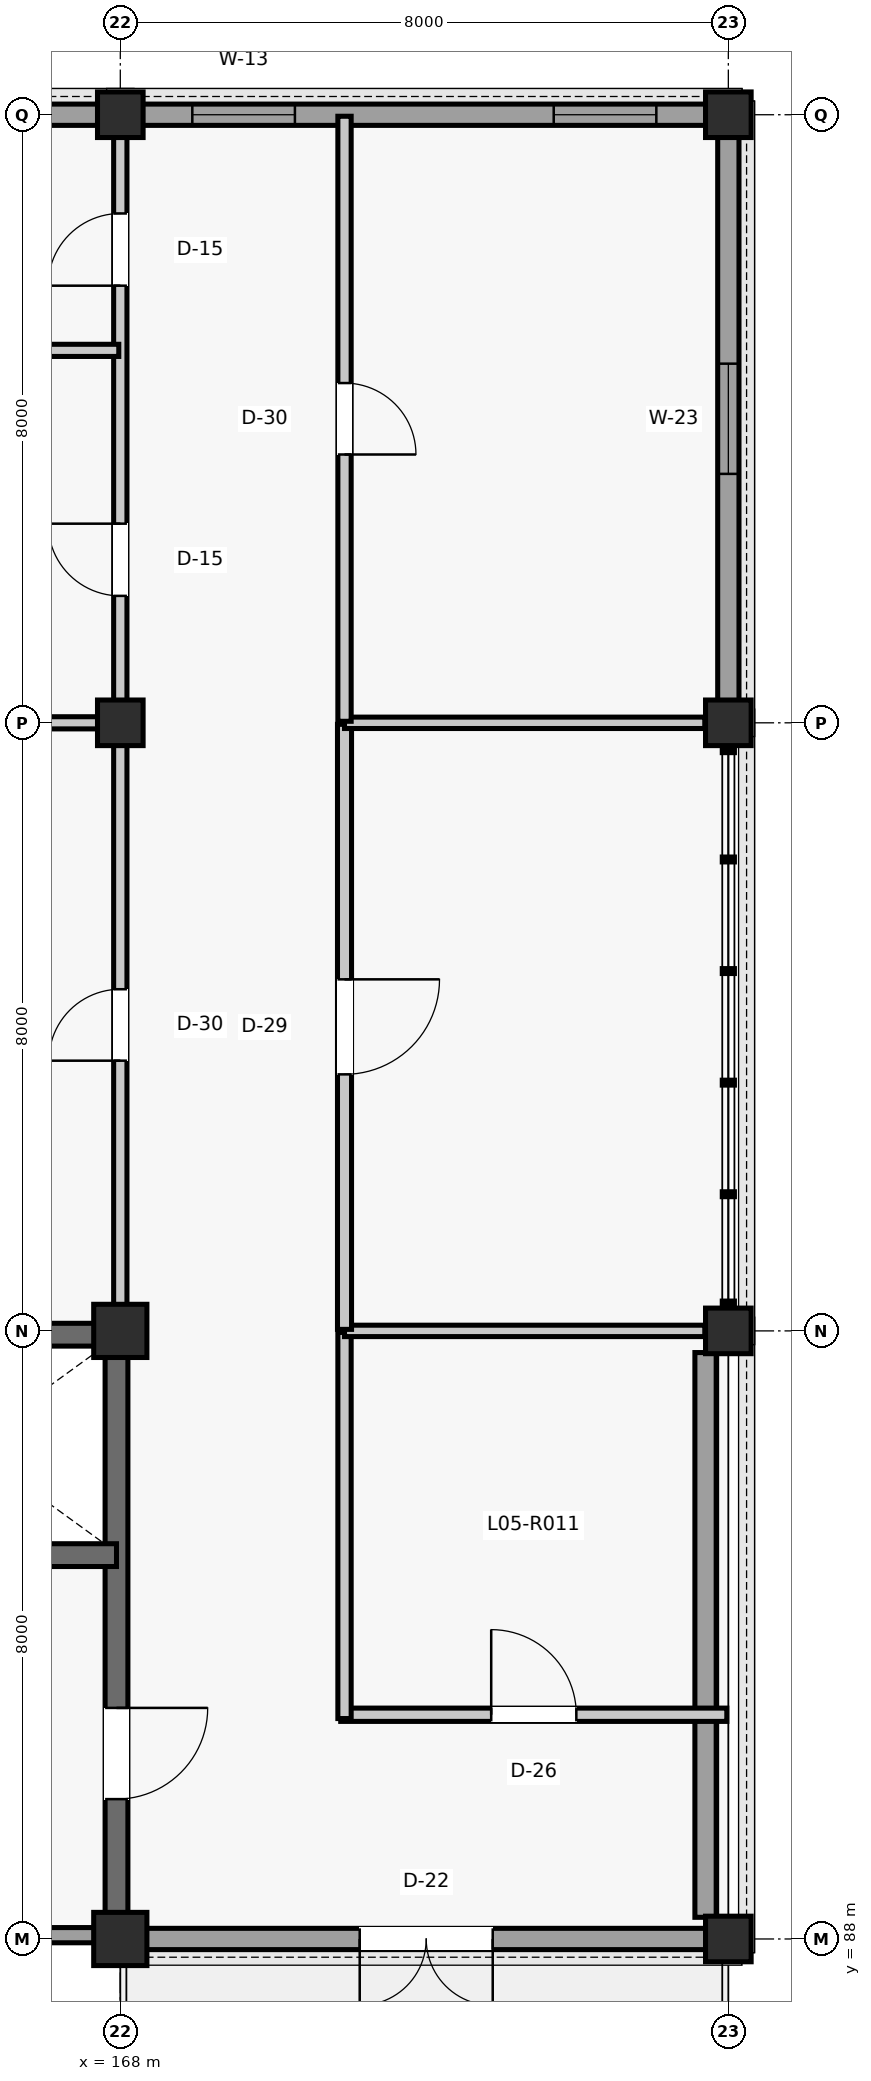
"""IFC4 building model, lengths in metres.
Left out: names, types, materials, properties, quantities, classifications, styles, units other than length and angle.
Written with IfcOpenShell. Run it as: python <this file> out.ifc"""

import sys

from ifc_helpers import new_model, si_unit, direction, frame, frame_2d, origin, origin_2d, place, context, subcontext, project, spatial, rectangle, extrude, element, fill, save


model = new_model("IFC4")
c1 = context("Model", 3, precision=1e-05, world=origin(), true_north=direction((0.0, 1.0)))
c2 = subcontext(c1, "Body", "Model", "MODEL_VIEW")
j1 = project(units=[si_unit("LENGTHUNIT", "METRE"), si_unit("PLANEANGLEUNIT", "RADIAN")], contexts=[c1])
p1 = place(None, origin())
s1 = spatial("IfcSite", under=j1, at=p1, CompositionType="ELEMENT")
p2 = place(p1, origin())
s2 = spatial("IfcBuilding", under=s1, at=p2, CompositionType="ELEMENT")
p3 = place(p2, frame((0.0, 0.0, 21.78)))
s3 = spatial("IfcBuildingStorey", under=s2, at=p3, CompositionType="ELEMENT", Elevation=21.78)
for number, where, z_axis, x_axis in (
    (1, (168.0, 88.0, 0.0), (0.0, 0.0, 1.0), (1.0, 0.0, 0.0)),
    (2, (168.0, 96.0, 0.0), (0.0, 0.0, 1.0), (1.0, 0.0, 0.0)),
):
    element("IfcColumn", number, at=place(p3, frame(where, z_axis=z_axis, x_axis=x_axis)), inside=s3, PredefinedType="COLUMN", context=c2, shape_type="SweptSolid", body=[
        extrude(rectangle(XDim=0.7, YDim=0.7, at=origin_2d()), origin(), (0.0, 0.0, 1.0), 3.96),
    ])
for number, where, z_axis, x_axis in (
    (3, (168.0, 104.0, 0.0), (0.0, 0.0, 1.0), (1.0, 0.0, 0.0)),
    (4, (168.0, 112.0, 0.0), (0.0, 0.0, 1.0), (1.0, 0.0, 0.0)),
    (5, (176.0, 88.0, 0.0), (0.0, 0.0, 1.0), (1.0, 0.0, 0.0)),
    (6, (176.0, 96.0, 0.0), (0.0, 0.0, 1.0), (1.0, 0.0, 0.0)),
    (7, (176.0, 104.0, 0.0), (0.0, 0.0, 1.0), (1.0, 0.0, 0.0)),
    (8, (176.0, 112.0, 0.0), (0.0, 0.0, 1.0), (1.0, 0.0, 0.0)),
):
    element("IfcColumn", number, at=place(p3, frame(where, z_axis=z_axis, x_axis=x_axis)), inside=s3, PredefinedType="COLUMN", context=c2, shape_type="SweptSolid", body=[
        extrude(rectangle(XDim=0.6, YDim=0.6, at=origin_2d()), origin(), (0.0, 0.0, 1.0), 3.96),
    ])
p4 = place(p3, frame((160.285, 112.0, 0.0), z_axis=(0.0, 0.0, 1.0), x_axis=(1.0, 0.0, 0.0)))
e9 = element("IfcWall", 9, at=p4, inside=s3, PredefinedType="SOLIDWALL", context=c2, shape_type="SweptSolid", body=[
    extrude(rectangle(XDim=7.43, YDim=0.28, at=frame_2d((3.715, 0.0))), origin(), (0.0, 0.0, 1.0), 3.372),
])
p5 = place(p4, frame((0.862, 0.0, 1.2)))
e10 = element("IfcOpeningElement", 10, at=p5, cuts=e9, PredefinedType="OPENING", context=c2, shape_type="SweptSolid", body=[
    extrude(rectangle(XDim=0.95, YDim=1.4, at=frame_2d((0.475, 0.7))), frame((0.0, 0.15, 0.0), z_axis=(0.0, -1.0, 0.0), x_axis=(1.0, 0.0, 0.0)), (0.0, 0.0, 1.0), 0.3),
])
p6 = place(p4, frame((5.618, 0.0, 1.2)))
e11 = element("IfcOpeningElement", 11, at=p6, cuts=e9, PredefinedType="OPENING", context=c2, shape_type="SweptSolid", body=[
    extrude(rectangle(XDim=0.95, YDim=1.4, at=frame_2d((0.475, 0.7))), frame((0.0, 0.15, 0.0), z_axis=(0.0, -1.0, 0.0), x_axis=(1.0, 0.0, 0.0)), (0.0, 0.0, 1.0), 0.3),
])
p7 = place(p3, frame((168.335, 88.0, 0.0), z_axis=(0.0, 0.0, 1.0), x_axis=(1.0, 0.0, 0.0)))
e12 = element("IfcWall", 12, at=p7, inside=s3, PredefinedType="SOLIDWALL", context=c2, shape_type="SweptSolid", body=[
    extrude(rectangle(XDim=7.38, YDim=0.28, at=frame_2d((3.69, 0.0))), origin(), (0.0, 0.0, 1.0), 3.259),
])
p8 = place(p7, frame((2.815, 0.0, 0.0)))
e13 = element("IfcOpeningElement", 13, at=p8, cuts=e12, PredefinedType="OPENING", context=c2, shape_type="SweptSolid", body=[
    extrude(rectangle(XDim=1.75, YDim=2.2, at=frame_2d((0.875, 1.1))), frame((0.0, 0.15, 0.0), z_axis=(0.0, -1.0, 0.0), x_axis=(1.0, 0.0, 0.0)), (0.0, 0.0, 1.0), 0.3),
])
p9 = place(p3, frame((175.7, 88.285, 0.0), z_axis=(0.0, 0.0, 1.0), x_axis=(0.0, 1.0, 0.0)))
e14 = element("IfcWall", 14, at=p9, inside=s3, PredefinedType="SOLIDWALL", context=c2, shape_type="SweptSolid", body=[
    extrude(rectangle(XDim=7.43, YDim=0.28, at=frame_2d((3.715, 0.0))), origin(), (0.0, 0.0, 1.0), 3.309),
])
p10 = place(p3, frame((168.285, 112.0, 0.0), z_axis=(0.0, 0.0, 1.0), x_axis=(1.0, 0.0, 0.0)))
e15 = element("IfcWall", 15, at=p10, inside=s3, PredefinedType="SOLIDWALL", context=c2, shape_type="SweptSolid", body=[
    extrude(rectangle(XDim=7.43, YDim=0.28, at=frame_2d((3.715, 0.0))), origin(), (0.0, 0.0, 1.0), 3.305),
])
p11 = place(p10, frame((0.662, 0.0, 0.95)))
e16 = element("IfcOpeningElement", 16, at=p11, cuts=e15, PredefinedType="OPENING", context=c2, shape_type="SweptSolid", body=[
    extrude(rectangle(XDim=1.35, YDim=1.9, at=frame_2d((0.675, 0.95))), frame((0.0, 0.15, 0.0), z_axis=(0.0, -1.0, 0.0), x_axis=(1.0, 0.0, 0.0)), (0.0, 0.0, 1.0), 0.3),
])
p12 = place(p10, frame((5.417, 0.0, 0.95)))
e17 = element("IfcOpeningElement", 17, at=p12, cuts=e15, PredefinedType="OPENING", context=c2, shape_type="SweptSolid", body=[
    extrude(rectangle(XDim=1.35, YDim=1.9, at=frame_2d((0.675, 0.95))), frame((0.0, 0.15, 0.0), z_axis=(0.0, -1.0, 0.0), x_axis=(1.0, 0.0, 0.0)), (0.0, 0.0, 1.0), 0.3),
])
p13 = place(p3, frame((176.0, 104.285, 0.0), z_axis=(0.0, 0.0, 1.0), x_axis=(0.0, 1.0, 0.0)))
e18 = element("IfcWall", 18, at=p13, inside=s3, PredefinedType="SOLIDWALL", context=c2, shape_type="SweptSolid", body=[
    extrude(rectangle(XDim=7.43, YDim=0.28, at=frame_2d((3.715, 0.0))), origin(), (0.0, 0.0, 1.0), 3.305),
])
p14 = place(p13, frame((2.99, 0.0, 0.9)))
e19 = element("IfcOpeningElement", 19, at=p14, cuts=e18, PredefinedType="OPENING", context=c2, shape_type="SweptSolid", body=[
    extrude(rectangle(XDim=1.45, YDim=2.15, at=frame_2d((0.725, 1.075))), frame((0.0, 0.15, 0.0), z_axis=(0.0, -1.0, 0.0), x_axis=(1.0, 0.0, 0.0)), (0.0, 0.0, 1.0), 0.3),
])
p15 = place(p3, frame((160.24, 95.95, 0.0), z_axis=(0.0, 0.0, 1.0), x_axis=(1.0, 0.0, 0.0)))
e20 = element("IfcWall", 20, at=p15, inside=s3, PredefinedType="SHEAR", context=c2, shape_type="SweptSolid", body=[
    extrude(rectangle(XDim=7.52, YDim=0.3, at=frame_2d((3.76, 0.0))), origin(), (0.0, 0.0, 1.0), 3.735),
])
p16 = place(p3, frame((167.95, 88.24, 0.0), z_axis=(0.0, 0.0, 1.0), x_axis=(0.0, 1.0, 0.0)))
e21 = element("IfcWall", 21, at=p16, inside=s3, PredefinedType="SHEAR", context=c2, shape_type="SweptSolid", body=[
    extrude(rectangle(XDim=7.52, YDim=0.3, at=frame_2d((3.76, 0.0))), origin(), (0.0, 0.0, 1.0), 3.735),
])
p17 = place(p16, frame((1.6, 0.0, 0.0)))
e22 = element("IfcOpeningElement", 22, at=p17, cuts=e21, PredefinedType="OPENING", context=c2, shape_type="SweptSolid", body=[
    extrude(rectangle(XDim=1.2, YDim=2.15, at=frame_2d((0.6, 1.075))), frame((0.0, 0.16, 0.0), z_axis=(0.0, -1.0, 0.0), x_axis=(1.0, 0.0, 0.0)), (0.0, 0.0, 1.0), 0.32),
])
p18 = place(p3, frame((164.0, 93.05, 0.0), z_axis=(0.0, 0.0, 1.0), x_axis=(1.0, 0.0, 0.0)))
e23 = element("IfcWall", 23, at=p18, inside=s3, PredefinedType="SHEAR", context=c2, shape_type="SweptSolid", body=[
    extrude(rectangle(XDim=3.95, YDim=0.3, at=frame_2d((1.975, 0.0))), origin(), (0.0, 0.0, 1.0), 3.735),
])
p19 = place(p18, frame((1.375, 0.0, 0.0)))
e24 = element("IfcOpeningElement", 24, at=p19, cuts=e23, PredefinedType="OPENING", context=c2, shape_type="SweptSolid", body=[
    extrude(rectangle(XDim=1.2, YDim=2.2, at=frame_2d((0.6, 1.1))), frame((0.0, 0.16, 0.0), z_axis=(0.0, -1.0, 0.0), x_axis=(1.0, 0.0, 0.0)), (0.0, 0.0, 1.0), 0.32),
])
p20 = place(p3, frame((164.0, 88.05, 0.0), z_axis=(0.0, 0.0, 1.0), x_axis=(1.0, 0.0, 0.0)))
e25 = element("IfcWall", 25, at=p20, inside=s3, PredefinedType="PARTITIONING", context=c2, shape_type="SweptSolid", body=[
    extrude(rectangle(XDim=3.66, YDim=0.2, at=frame_2d((1.83, 0.0))), origin(), (0.0, 0.0, 1.0), 3.303),
])
p21 = place(p3, frame((170.9, 90.95, 0.0), z_axis=(0.0, 0.0, 1.0), x_axis=(1.0, 0.0, 0.0)))
e26 = element("IfcWall", 26, at=p21, inside=s3, PredefinedType="PARTITIONING", context=c2, shape_type="SweptSolid", body=[
    extrude(rectangle(XDim=5.08, YDim=0.175, at=frame_2d((2.54, 0.0))), origin(), (0.0, 0.0, 1.0), 3.302),
])
p22 = place(p21, frame((1.98, 0.0, 0.0)))
e27 = element("IfcOpeningElement", 27, at=p22, cuts=e26, PredefinedType="OPENING", context=c2, shape_type="SweptSolid", body=[
    extrude(rectangle(XDim=1.12, YDim=2.22, at=frame_2d((0.56, 1.11))), frame((0.0, 0.097, 0.0), z_axis=(0.0, -1.0, 0.0), x_axis=(1.0, 0.0, 0.0)), (0.0, 0.0, 1.0), 0.195),
])
p23 = place(p3, frame((170.95, 90.9, 0.0), z_axis=(0.0, 0.0, 1.0), x_axis=(0.0, 1.0, 0.0)))
e28 = element("IfcWall", 28, at=p23, inside=s3, PredefinedType="PARTITIONING", context=c2, shape_type="SweptSolid", body=[
    extrude(rectangle(XDim=5.08, YDim=0.175, at=frame_2d((2.54, 0.0))), origin(), (0.0, 0.0, 1.0), 3.258),
])
p24 = place(p3, frame((170.95, 96.0, 0.0), z_axis=(0.0, 0.0, 1.0), x_axis=(1.0, 0.0, 0.0)))
e29 = element("IfcWall", 29, at=p24, inside=s3, PredefinedType="PARTITIONING", context=c2, shape_type="SweptSolid", body=[
    extrude(rectangle(XDim=4.74, YDim=0.15, at=frame_2d((2.37, 0.0))), origin(), (0.0, 0.0, 1.0), 3.258),
])
p25 = place(p3, frame((170.95, 96.02, 0.0), z_axis=(0.0, 0.0, 1.0), x_axis=(0.0, 1.0, 0.0)))
e30 = element("IfcWall", 30, at=p25, inside=s3, PredefinedType="PARTITIONING", context=c2, shape_type="SweptSolid", body=[
    extrude(rectangle(XDim=7.96, YDim=0.185, at=frame_2d((3.98, 0.0))), origin(), (0.0, 0.0, 1.0), 3.246),
])
p26 = place(p25, frame((3.355, 0.0, 0.0)))
e31 = element("IfcOpeningElement", 31, at=p26, cuts=e30, PredefinedType="OPENING", context=c2, shape_type="SweptSolid", body=[
    extrude(rectangle(XDim=1.25, YDim=2.18, at=frame_2d((0.625, 1.09))), frame((0.0, 0.103, 0.0), z_axis=(0.0, -1.0, 0.0), x_axis=(1.0, 0.0, 0.0)), (0.0, 0.0, 1.0), 0.205),
])
p27 = place(p3, frame((170.95, 104.0, 0.0), z_axis=(0.0, 0.0, 1.0), x_axis=(1.0, 0.0, 0.0)))
e32 = element("IfcWall", 32, at=p27, inside=s3, PredefinedType="PARTITIONING", context=c2, shape_type="SweptSolid", body=[
    extrude(rectangle(XDim=4.74, YDim=0.15, at=frame_2d((2.37, 0.0))), origin(), (0.0, 0.0, 1.0), 3.246),
])
p28 = place(p3, frame((170.95, 104.02, 0.0), z_axis=(0.0, 0.0, 1.0), x_axis=(0.0, 1.0, 0.0)))
e33 = element("IfcWall", 33, at=p28, inside=s3, PredefinedType="PARTITIONING", context=c2, shape_type="SweptSolid", body=[
    extrude(rectangle(XDim=7.96, YDim=0.175, at=frame_2d((3.98, 0.0))), origin(), (0.0, 0.0, 1.0), 3.246),
])
p29 = place(p28, frame((3.51, 0.0, 0.0)))
e34 = element("IfcOpeningElement", 34, at=p29, cuts=e33, PredefinedType="OPENING", context=c2, shape_type="SweptSolid", body=[
    extrude(rectangle(XDim=0.94, YDim=2.12, at=frame_2d((0.47, 1.06))), frame((0.0, 0.097, 0.0), z_axis=(0.0, -1.0, 0.0), x_axis=(1.0, 0.0, 0.0)), (0.0, 0.0, 1.0), 0.195),
])
p30 = place(p3, frame((168.0, 96.34, 0.0), z_axis=(0.0, 0.0, 1.0), x_axis=(0.0, 1.0, 0.0)))
e35 = element("IfcWall", 35, at=p30, inside=s3, PredefinedType="PARTITIONING", context=c2, shape_type="SweptSolid", body=[
    extrude(rectangle(XDim=7.37, YDim=0.175, at=frame_2d((3.685, 0.0))), origin(), (0.0, 0.0, 1.0), 3.257),
])
p31 = place(p30, frame((3.215, 0.0, 0.0)))
e36 = element("IfcOpeningElement", 36, at=p31, cuts=e35, PredefinedType="OPENING", context=c2, shape_type="SweptSolid", body=[
    extrude(rectangle(XDim=0.94, YDim=2.12, at=frame_2d((0.47, 1.06))), frame((0.0, 0.097, 0.0), z_axis=(0.0, -1.0, 0.0), x_axis=(1.0, 0.0, 0.0)), (0.0, 0.0, 1.0), 0.195),
])
p32 = place(p3, frame((160.29, 104.0, 0.0), z_axis=(0.0, 0.0, 1.0), x_axis=(1.0, 0.0, 0.0)))
e37 = element("IfcWall", 37, at=p32, inside=s3, PredefinedType="PARTITIONING", context=c2, shape_type="SweptSolid", body=[
    extrude(rectangle(XDim=7.42, YDim=0.16, at=frame_2d((3.71, 0.0))), origin(), (0.0, 0.0, 1.0), 3.263),
])
p33 = place(p3, frame((168.0, 104.29, 0.0), z_axis=(0.0, 0.0, 1.0), x_axis=(0.0, 1.0, 0.0)))
e38 = element("IfcWall", 38, at=p33, inside=s3, PredefinedType="PARTITIONING", context=c2, shape_type="SweptSolid", body=[
    extrude(rectangle(XDim=7.42, YDim=0.175, at=frame_2d((3.71, 0.0))), origin(), (0.0, 0.0, 1.0), 3.258),
])
p34 = place(p33, frame((1.38, 0.0, 0.0)))
e39 = element("IfcOpeningElement", 39, at=p34, cuts=e38, PredefinedType="OPENING", context=c2, shape_type="SweptSolid", body=[
    extrude(rectangle(XDim=0.95, YDim=2.1, at=frame_2d((0.475, 1.05))), frame((0.0, 0.097, 0.0), z_axis=(0.0, -1.0, 0.0), x_axis=(1.0, 0.0, 0.0)), (0.0, 0.0, 1.0), 0.195),
])
p35 = place(p33, frame((5.461, 0.0, 0.0)))
e40 = element("IfcOpeningElement", 40, at=p35, cuts=e38, PredefinedType="OPENING", context=c2, shape_type="SweptSolid", body=[
    extrude(rectangle(XDim=0.95, YDim=2.1, at=frame_2d((0.475, 1.05))), frame((0.0, 0.097, 0.0), z_axis=(0.0, -1.0, 0.0), x_axis=(1.0, 0.0, 0.0)), (0.0, 0.0, 1.0), 0.195),
])
p36 = place(p3, frame((160.02, 108.9, 0.0), z_axis=(0.0, 0.0, 1.0), x_axis=(1.0, 0.0, 0.0)))
e41 = element("IfcWall", 41, at=p36, inside=s3, PredefinedType="PARTITIONING", context=c2, shape_type="SweptSolid", body=[
    extrude(rectangle(XDim=7.96, YDim=0.16, at=frame_2d((3.98, 0.0))), origin(), (0.0, 0.0, 1.0), 3.252),
])
p37 = place(p8, frame((1.75, 0.0, 0.0), z_axis=(0.0, 0.0, 1.0), x_axis=(-1.0, 0.0, 0.0)))
e42 = element("IfcDoor", 42, at=p37, inside=s3, OperationType="DOUBLE_DOOR_SINGLE_SWING", PredefinedType="DOOR", context=c2, shape_type="SweptSolid", body=[
    extrude(rectangle(XDim=1.75, YDim=2.2, at=frame_2d((0.875, 1.1))), frame((0.0, 0.025, 0.0), z_axis=(0.0, -1.0, 0.0), x_axis=(1.0, 0.0, 0.0)), (0.0, 0.0, 1.0), 0.05),
])
fill(e13, e42)
p38 = place(p11, origin())
e43 = element("IfcWindow", 43, at=p38, inside=s3, PartitioningType="SINGLE_PANEL", PredefinedType="WINDOW", context=c2, shape_type="SweptSolid", body=[
    extrude(rectangle(XDim=1.35, YDim=1.9, at=frame_2d((0.675, 0.95))), frame((0.0, 0.03, 0.0), z_axis=(0.0, -1.0, 0.0), x_axis=(1.0, 0.0, 0.0)), (0.0, 0.0, 1.0), 0.06),
])
fill(e16, e43)
p39 = place(p12, origin())
e44 = element("IfcWindow", 44, at=p39, inside=s3, PartitioningType="SINGLE_PANEL", PredefinedType="WINDOW", context=c2, shape_type="SweptSolid", body=[
    extrude(rectangle(XDim=1.35, YDim=1.9, at=frame_2d((0.675, 0.95))), frame((0.0, 0.03, 0.0), z_axis=(0.0, -1.0, 0.0), x_axis=(1.0, 0.0, 0.0)), (0.0, 0.0, 1.0), 0.06),
])
fill(e17, e44)
p40 = place(p14, origin())
e45 = element("IfcWindow", 45, at=p40, inside=s3, PartitioningType="SINGLE_PANEL", PredefinedType="WINDOW", context=c2, shape_type="SweptSolid", body=[
    extrude(rectangle(XDim=1.45, YDim=2.15, at=frame_2d((0.725, 1.075))), frame((0.0, 0.03, 0.0), z_axis=(0.0, -1.0, 0.0), x_axis=(1.0, 0.0, 0.0)), (0.0, 0.0, 1.0), 0.06),
])
fill(e19, e45)
p41 = place(p17, frame((1.2, 0.0, 0.0), z_axis=(0.0, 0.0, 1.0), x_axis=(-1.0, 0.0, 0.0)))
e46 = element("IfcDoor", 46, at=p41, inside=s3, OperationType="SINGLE_SWING_RIGHT", PredefinedType="DOOR", context=c2, shape_type="SweptSolid", body=[
    extrude(rectangle(XDim=1.2, YDim=2.15, at=frame_2d((0.6, 1.075))), frame((0.0, 0.025, 0.0), z_axis=(0.0, -1.0, 0.0), x_axis=(1.0, 0.0, 0.0)), (0.0, 0.0, 1.0), 0.05),
])
fill(e22, e46)
p42 = place(p22, origin())
e47 = element("IfcDoor", 47, at=p42, inside=s3, OperationType="SINGLE_SWING_LEFT", PredefinedType="DOOR", context=c2, shape_type="SweptSolid", body=[
    extrude(rectangle(XDim=1.12, YDim=2.22, at=frame_2d((0.56, 1.11))), frame((0.0, 0.025, 0.0), z_axis=(0.0, -1.0, 0.0), x_axis=(1.0, 0.0, 0.0)), (0.0, 0.0, 1.0), 0.05),
])
fill(e27, e47)
p43 = place(p26, frame((1.25, 0.0, 0.0), z_axis=(0.0, 0.0, 1.0), x_axis=(-1.0, 0.0, 0.0)))
e48 = element("IfcDoor", 48, at=p43, inside=s3, OperationType="SINGLE_SWING_RIGHT", PredefinedType="DOOR", context=c2, shape_type="SweptSolid", body=[
    extrude(rectangle(XDim=1.25, YDim=2.18, at=frame_2d((0.625, 1.09))), frame((0.0, 0.025, 0.0), z_axis=(0.0, -1.0, 0.0), x_axis=(1.0, 0.0, 0.0)), (0.0, 0.0, 1.0), 0.05),
])
fill(e31, e48)
p44 = place(p29, frame((0.94, 0.0, 0.0), z_axis=(0.0, 0.0, 1.0), x_axis=(-1.0, 0.0, 0.0)))
e49 = element("IfcDoor", 49, at=p44, inside=s3, OperationType="SINGLE_SWING_LEFT", PredefinedType="DOOR", context=c2, shape_type="SweptSolid", body=[
    extrude(rectangle(XDim=0.94, YDim=2.12, at=frame_2d((0.47, 1.06))), frame((0.0, 0.025, 0.0), z_axis=(0.0, -1.0, 0.0), x_axis=(1.0, 0.0, 0.0)), (0.0, 0.0, 1.0), 0.05),
])
fill(e34, e49)
p45 = place(p31, origin())
e50 = element("IfcDoor", 50, at=p45, inside=s3, OperationType="SINGLE_SWING_LEFT", PredefinedType="DOOR", context=c2, shape_type="SweptSolid", body=[
    extrude(rectangle(XDim=0.94, YDim=2.12, at=frame_2d((0.47, 1.06))), frame((0.0, 0.025, 0.0), z_axis=(0.0, -1.0, 0.0), x_axis=(1.0, 0.0, 0.0)), (0.0, 0.0, 1.0), 0.05),
])
fill(e36, e50)
p46 = place(p34, origin())
e51 = element("IfcDoor", 51, at=p46, inside=s3, OperationType="SINGLE_SWING_RIGHT", PredefinedType="DOOR", context=c2, shape_type="SweptSolid", body=[
    extrude(rectangle(XDim=0.95, YDim=2.1, at=frame_2d((0.475, 1.05))), frame((0.0, 0.025, 0.0), z_axis=(0.0, -1.0, 0.0), x_axis=(1.0, 0.0, 0.0)), (0.0, 0.0, 1.0), 0.05),
])
fill(e39, e51)
p47 = place(p35, origin())
e52 = element("IfcDoor", 52, at=p47, inside=s3, OperationType="SINGLE_SWING_LEFT", PredefinedType="DOOR", context=c2, shape_type="SweptSolid", body=[
    extrude(rectangle(XDim=0.95, YDim=2.1, at=frame_2d((0.475, 1.05))), frame((0.0, 0.025, 0.0), z_axis=(0.0, -1.0, 0.0), x_axis=(1.0, 0.0, 0.0)), (0.0, 0.0, 1.0), 0.05),
])
fill(e40, e52)
save(model, sys.argv[1])
